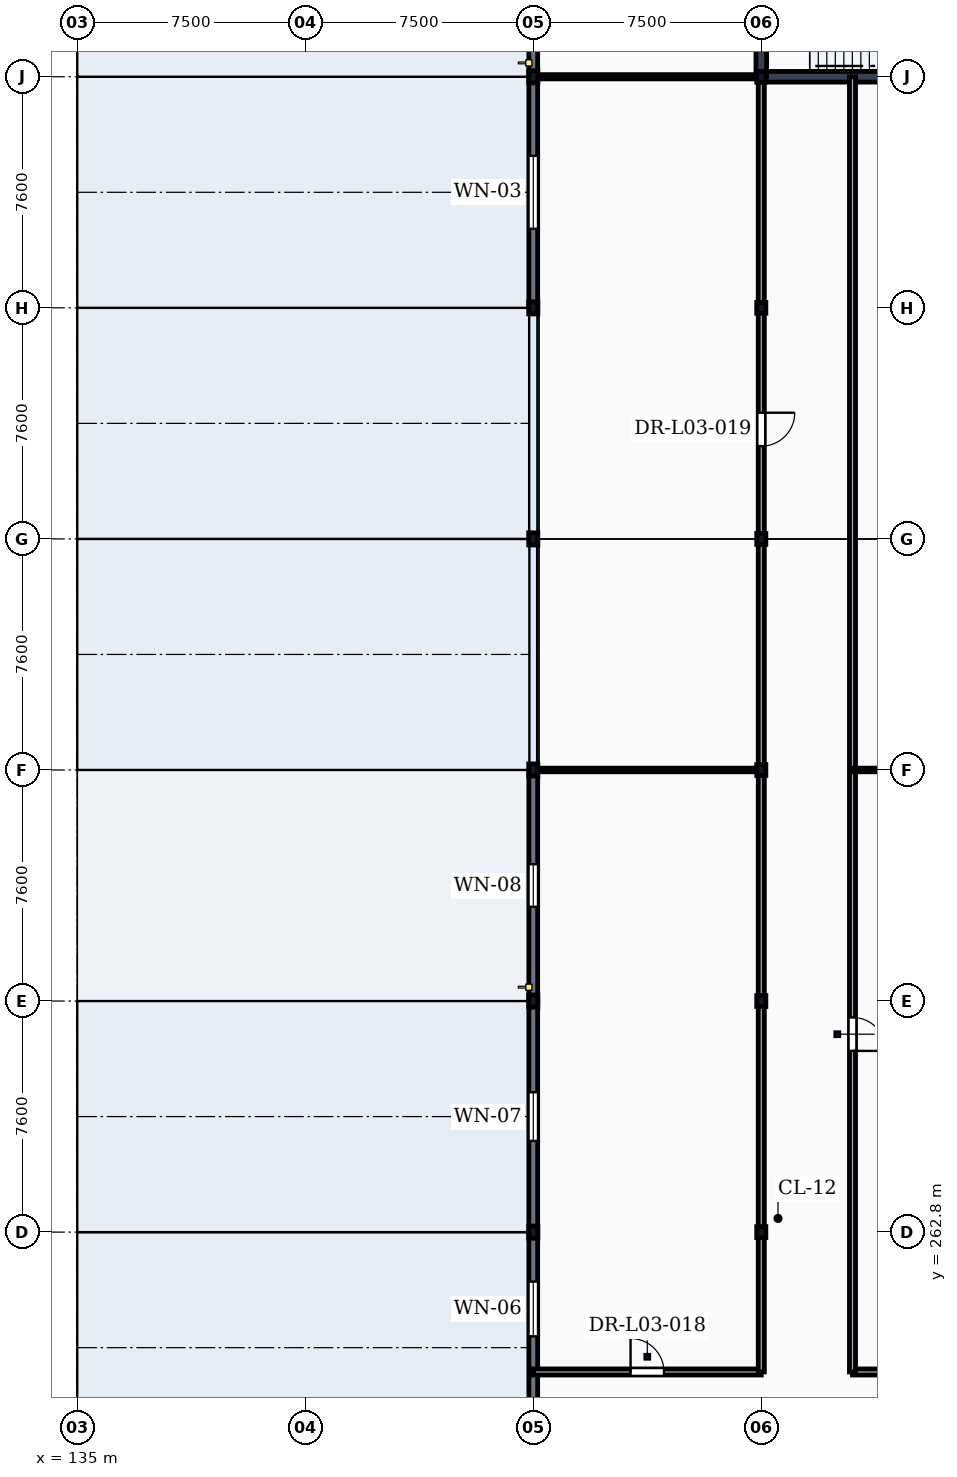
"""IFC4 building model, lengths in metres.
Left out: names, types, materials, properties, quantities, classifications, styles, units other than length and angle.
Written with IfcOpenShell. Run it as: python <this file> out.ifc"""

import sys

from ifc_helpers import new_model, si_unit, direction, frame, frame_2d, origin, origin_2d, place, context, subcontext, project, spatial, rectangle, i_section, extrude, element, fill, save


model = new_model("IFC4")
c1 = context("Model", 3, precision=1e-05, world=origin(), true_north=direction((0.0, 1.0)))
c2 = subcontext(c1, "Body", "Model", "MODEL_VIEW")
j1 = project(units=[si_unit("LENGTHUNIT", "METRE"), si_unit("PLANEANGLEUNIT", "RADIAN")], contexts=[c1])
p1 = place(None, origin())
s1 = spatial("IfcSite", under=j1, at=p1, CompositionType="ELEMENT")
p2 = place(p1, origin())
s2 = spatial("IfcBuilding", under=s1, at=p2, CompositionType="ELEMENT")
p3 = place(p2, frame((0.0, 0.0, 5.4)))
s3 = spatial("IfcBuildingStorey", under=s2, at=p3, CompositionType="ELEMENT", Elevation=5.4)
for number, where, z_axis, x_axis in (
    (1, (135.0, 262.8, 0.0), (0.0, 0.0, 1.0), (1.0, 0.0, 0.0)),
    (2, (135.0, 270.4, 0.0), (0.0, 0.0, 1.0), (1.0, 0.0, 0.0)),
    (3, (135.0, 278.0, 0.0), (0.0, 0.0, 1.0), (1.0, 0.0, 0.0)),
    (4, (135.0, 285.6, 0.0), (0.0, 0.0, 1.0), (1.0, 0.0, 0.0)),
    (5, (135.0, 293.2, 0.0), (0.0, 0.0, 1.0), (1.0, 0.0, 0.0)),
    (6, (135.0, 300.8, 0.0), (0.0, 0.0, 1.0), (1.0, 0.0, 0.0)),
):
    element("IfcColumn", number, at=place(p3, frame(where, z_axis=z_axis, x_axis=x_axis)), inside=s3, PredefinedType="COLUMN", context=c2, shape_type="SweptSolid", body=[
        extrude(i_section(OverallWidth=0.3, OverallDepth=0.45, WebThickness=0.014, FlangeThickness=0.026, FilletRadius=0.027, at=origin_2d()), origin(), (0.0, 0.0, 1.0), 5.1),
    ])
for number, where, z_axis, x_axis in (
    (7, (142.5, 262.8, 0.0), (0.0, 0.0, 1.0), (1.0, 0.0, 0.0)),
    (8, (142.5, 270.4, 0.0), (0.0, 0.0, 1.0), (1.0, 0.0, 0.0)),
    (9, (142.5, 278.0, 0.0), (0.0, 0.0, 1.0), (1.0, 0.0, 0.0)),
    (10, (142.5, 285.6, 0.0), (0.0, 0.0, 1.0), (1.0, 0.0, 0.0)),
    (11, (142.5, 293.2, 0.0), (0.0, 0.0, 1.0), (1.0, 0.0, 0.0)),
    (12, (142.5, 300.8, 0.0), (0.0, 0.0, 1.0), (1.0, 0.0, 0.0)),
):
    element("IfcColumn", number, at=place(p3, frame(where, z_axis=z_axis, x_axis=x_axis)), inside=s3, PredefinedType="COLUMN", context=c2, shape_type="SweptSolid", body=[
        extrude(i_section(OverallWidth=0.3, OverallDepth=0.4, WebThickness=0.013, FlangeThickness=0.024, FilletRadius=0.027, at=origin_2d()), origin(), (0.0, 0.0, 1.0), 5.1),
    ])
for number, where, z_axis, x_axis in (
    (13, (150.0, 262.8, 0.0), (0.0, 0.0, 1.0), (1.0, 0.0, 0.0)),
    (14, (150.0, 270.4, 0.0), (0.0, 0.0, 1.0), (1.0, 0.0, 0.0)),
    (15, (150.0, 278.0, 0.0), (0.0, 0.0, 1.0), (1.0, 0.0, 0.0)),
    (16, (150.0, 285.6, 0.0), (0.0, 0.0, 1.0), (1.0, 0.0, 0.0)),
    (17, (150.0, 293.2, 0.0), (0.0, 0.0, 1.0), (1.0, 0.0, 0.0)),
    (18, (150.0, 300.8, 0.0), (0.0, 0.0, 1.0), (1.0, 0.0, 0.0)),
):
    element("IfcColumn", number, at=place(p3, frame(where, z_axis=z_axis, x_axis=x_axis)), inside=s3, PredefinedType="COLUMN", context=c2, shape_type="SweptSolid", body=[
        extrude(i_section(OverallWidth=0.3, OverallDepth=0.45, WebThickness=0.014, FlangeThickness=0.026, FilletRadius=0.027, at=origin_2d()), origin(), (0.0, 0.0, 1.0), 5.1),
    ])
for number, where, z_axis, x_axis in (
    (19, (157.5, 262.8, 0.0), (0.0, 0.0, 1.0), (1.0, 0.0, 0.0)),
    (20, (157.5, 270.4, 0.0), (0.0, 0.0, 1.0), (1.0, 0.0, 0.0)),
    (21, (157.5, 278.0, 0.0), (0.0, 0.0, 1.0), (1.0, 0.0, 0.0)),
    (22, (157.5, 285.6, 0.0), (0.0, 0.0, 1.0), (1.0, 0.0, 0.0)),
    (23, (157.5, 293.2, 0.0), (0.0, 0.0, 1.0), (1.0, 0.0, 0.0)),
    (24, (157.5, 300.8, 0.0), (0.0, 0.0, 1.0), (1.0, 0.0, 0.0)),
):
    element("IfcColumn", number, at=place(p3, frame(where, z_axis=z_axis, x_axis=x_axis)), inside=s3, PredefinedType="COLUMN", context=c2, shape_type="SweptSolid", body=[
        extrude(i_section(OverallWidth=0.3, OverallDepth=0.4, WebThickness=0.013, FlangeThickness=0.024, FilletRadius=0.027, at=origin_2d()), origin(), (0.0, 0.0, 1.0), 5.1),
    ])
p4 = place(p3, frame((135.0, 255.206, 0.0), z_axis=(0.0, 0.0, 1.0), x_axis=(0.0, 1.0, 0.0)))
e25 = element("IfcWall", 25, at=p4, inside=s3, PredefinedType="SOLIDWALL", context=c2, shape_type="SweptSolid", body=[
    extrude(rectangle(XDim=7.588, YDim=0.29, at=frame_2d((3.794, 0.0))), origin(), (0.0, 0.0, 1.0), 4.578),
])
p5 = place(p4, frame((4.066, 0.0, 0.95)))
e26 = element("IfcOpeningElement", 26, at=p5, cuts=e25, PredefinedType="OPENING", context=c2, shape_type="SweptSolid", body=[
    extrude(rectangle(XDim=2.0, YDim=2.6, at=frame_2d((1.0, 1.3))), frame((0.0, 0.16, 0.0), z_axis=(0.0, -1.0, 0.0), x_axis=(1.0, 0.0, 0.0)), (0.0, 0.0, 1.0), 0.32),
])
p6 = place(p3, frame((135.0, 262.806, 0.0), z_axis=(0.0, 0.0, 1.0), x_axis=(0.0, 1.0, 0.0)))
e27 = element("IfcWall", 27, at=p6, inside=s3, PredefinedType="SOLIDWALL", context=c2, shape_type="SweptSolid", body=[
    extrude(rectangle(XDim=7.588, YDim=0.29, at=frame_2d((3.794, 0.0))), origin(), (0.0, 0.0, 1.0), 4.578),
])
p7 = place(p6, frame((2.894, 0.0, 0.95)))
e28 = element("IfcOpeningElement", 28, at=p7, cuts=e27, PredefinedType="OPENING", context=c2, shape_type="SweptSolid", body=[
    extrude(rectangle(XDim=1.8, YDim=2.6, at=frame_2d((0.9, 1.3))), frame((0.0, 0.16, 0.0), z_axis=(0.0, -1.0, 0.0), x_axis=(1.0, 0.0, 0.0)), (0.0, 0.0, 1.0), 0.32),
])
p8 = place(p3, frame((135.0, 270.406, 0.0), z_axis=(0.0, 0.0, 1.0), x_axis=(0.0, 1.0, 0.0)))
e29 = element("IfcWall", 29, at=p8, inside=s3, PredefinedType="SOLIDWALL", context=c2, shape_type="SweptSolid", body=[
    extrude(rectangle(XDim=7.588, YDim=0.29, at=frame_2d((3.794, 0.0))), origin(), (0.0, 0.0, 1.0), 4.578),
])
p9 = place(p8, frame((2.994, 0.0, 0.95)))
e30 = element("IfcOpeningElement", 30, at=p9, cuts=e29, PredefinedType="OPENING", context=c2, shape_type="SweptSolid", body=[
    extrude(rectangle(XDim=1.6, YDim=2.4, at=frame_2d((0.8, 1.2))), frame((0.0, 0.16, 0.0), z_axis=(0.0, -1.0, 0.0), x_axis=(1.0, 0.0, 0.0)), (0.0, 0.0, 1.0), 0.32),
])
p10 = place(p3, frame((135.0, 293.206, 0.0), z_axis=(0.0, 0.0, 1.0), x_axis=(0.0, 1.0, 0.0)))
e31 = element("IfcWall", 31, at=p10, inside=s3, PredefinedType="SOLIDWALL", context=c2, shape_type="SweptSolid", body=[
    extrude(rectangle(XDim=7.588, YDim=0.29, at=frame_2d((3.794, 0.0))), origin(), (0.0, 0.0, 1.0), 4.578),
])
p11 = place(p10, frame((2.494, 0.0, 0.95)))
e32 = element("IfcOpeningElement", 32, at=p11, cuts=e31, PredefinedType="OPENING", context=c2, shape_type="SweptSolid", body=[
    extrude(rectangle(XDim=2.6, YDim=3.0, at=frame_2d((1.3, 1.5))), frame((0.0, 0.16, 0.0), z_axis=(0.0, -1.0, 0.0), x_axis=(1.0, 0.0, 0.0)), (0.0, 0.0, 1.0), 0.32),
])
p12 = place(p3, frame((135.0, 300.806, 0.0), z_axis=(0.0, 0.0, 1.0), x_axis=(0.0, 1.0, 0.0)))
e33 = element("IfcWall", 33, at=p12, inside=s3, PredefinedType="SOLIDWALL", context=c2, shape_type="SweptSolid", body=[
    extrude(rectangle(XDim=7.588, YDim=0.29, at=frame_2d((3.794, 0.0))), origin(), (0.0, 0.0, 1.0), 4.578),
])
p13 = place(p12, frame((2.594, 0.0, 0.95)))
e34 = element("IfcOpeningElement", 34, at=p13, cuts=e33, PredefinedType="OPENING", context=c2, shape_type="SweptSolid", body=[
    extrude(rectangle(XDim=2.4, YDim=2.8, at=frame_2d((1.2, 1.4))), frame((0.0, 0.16, 0.0), z_axis=(0.0, -1.0, 0.0), x_axis=(1.0, 0.0, 0.0)), (0.0, 0.0, 1.0), 0.32),
])
p14 = place(p3, frame((135.1, 248.6, 5.1), z_axis=(0.0, 0.0, 1.0), x_axis=(0.0, 1.0, 0.0)))
e35 = element("IfcWall", 35, at=p14, inside=s3, PredefinedType="PARAPET", context=c2, shape_type="SweptSolid", body=[
    extrude(rectangle(XDim=89.2, YDim=0.18, at=frame_2d((44.6, 0.0))), origin(), (0.0, 0.0, 1.0), 1.2),
])
p15 = place(p3, frame((157.5, 300.8, 0.0), z_axis=(0.0, 0.0, 1.0), x_axis=(1.0, 0.0, 0.0)))
e36 = element("IfcWall", 36, at=p15, inside=s3, PredefinedType="SHEAR", context=c2, shape_type="SweptSolid", body=[
    extrude(rectangle(XDim=7.5, YDim=0.35, at=frame_2d((3.75, 0.0))), origin(), (0.0, 0.0, 1.0), 4.86),
])
p16 = place(p3, frame((157.5, 300.8, 0.0), z_axis=(0.0, 0.0, 1.0), x_axis=(0.0, 1.0, 0.0)))
e37 = element("IfcWall", 37, at=p16, inside=s3, PredefinedType="SHEAR", context=c2, shape_type="SweptSolid", body=[
    extrude(rectangle(XDim=7.6, YDim=0.35, at=frame_2d((3.8, 0.0))), origin(), (0.0, 0.0, 1.0), 4.86),
])
p17 = place(p3, frame((135.0, 258.2, 0.0), z_axis=(0.0, 0.0, 1.0), x_axis=(1.0, 0.0, 0.0)))
e38 = element("IfcWall", 38, at=p17, inside=s3, PredefinedType="PARTITIONING", context=c2, shape_type="SweptSolid", body=[
    extrude(rectangle(XDim=22.5, YDim=0.2, at=frame_2d((11.25, 0.0))), origin(), (0.0, 0.0, 1.0), 4.85),
])
p18 = place(p17, frame((10.25, 0.0, 0.0)))
e39 = element("IfcOpeningElement", 39, at=p18, cuts=e38, PredefinedType="OPENING", context=c2, shape_type="SweptSolid", body=[
    extrude(rectangle(XDim=1.5, YDim=2.25, at=frame_2d((0.75, 1.125))), frame((0.0, 0.115, 0.0), z_axis=(0.0, -1.0, 0.0), x_axis=(1.0, 0.0, 0.0)), (0.0, 0.0, 1.0), 0.23),
])
p19 = place(p3, frame((157.5, 258.2, 0.0), z_axis=(0.0, 0.0, 1.0), x_axis=(0.0, 1.0, 0.0)))
e40 = element("IfcWall", 40, at=p19, inside=s3, PredefinedType="PARTITIONING", context=c2, shape_type="SweptSolid", body=[
    extrude(rectangle(XDim=42.6, YDim=0.2, at=frame_2d((21.3, 0.0))), origin(), (0.0, 0.0, 1.0), 4.498),
])
p20 = place(p19, frame((9.45, 0.0, 0.0)))
e41 = element("IfcOpeningElement", 41, at=p20, cuts=e40, PredefinedType="OPENING", context=c2, shape_type="SweptSolid", body=[
    extrude(rectangle(XDim=1.1, YDim=2.1, at=frame_2d((0.55, 1.05))), frame((0.0, 0.115, 0.0), z_axis=(0.0, -1.0, 0.0), x_axis=(1.0, 0.0, 0.0)), (0.0, 0.0, 1.0), 0.23),
])
p21 = place(p19, frame((30.45, 0.0, 0.0)))
e42 = element("IfcOpeningElement", 42, at=p21, cuts=e40, PredefinedType="OPENING", context=c2, shape_type="SweptSolid", body=[
    extrude(rectangle(XDim=1.1, YDim=2.1, at=frame_2d((0.55, 1.05))), frame((0.0, 0.115, 0.0), z_axis=(0.0, -1.0, 0.0), x_axis=(1.0, 0.0, 0.0)), (0.0, 0.0, 1.0), 0.23),
])
p22 = place(p3, frame((160.5, 258.2, 0.0), z_axis=(0.0, 0.0, 1.0), x_axis=(0.0, 1.0, 0.0)))
e43 = element("IfcWall", 43, at=p22, inside=s3, PredefinedType="PARTITIONING", context=c2, shape_type="SweptSolid", body=[
    extrude(rectangle(XDim=42.6, YDim=0.2, at=frame_2d((21.3, 0.0))), origin(), (0.0, 0.0, 1.0), 4.86),
])
p23 = place(p22, frame((20.34, 0.0, 0.0)))
e44 = element("IfcOpeningElement", 44, at=p23, cuts=e43, PredefinedType="OPENING", context=c2, shape_type="SweptSolid", body=[
    extrude(rectangle(XDim=1.8, YDim=2.4, at=frame_2d((0.9, 1.2))), frame((0.0, 0.115, 0.0), z_axis=(0.0, -1.0, 0.0), x_axis=(1.0, 0.0, 0.0)), (0.0, 0.0, 1.0), 0.23),
])
p24 = place(p3, frame((135.0, 278.0, 0.0), z_axis=(0.0, 0.0, 1.0), x_axis=(1.0, 0.0, 0.0)))
e45 = element("IfcWall", 45, at=p24, inside=s3, PredefinedType="PARTITIONING", context=c2, shape_type="SweptSolid", body=[
    extrude(rectangle(XDim=22.5, YDim=0.12, at=frame_2d((11.25, 0.0))), origin(), (0.0, 0.0, 1.0), 4.488),
])
p25 = place(p24, frame((8.3, 0.0, 0.0)))
e46 = element("IfcOpeningElement", 46, at=p25, cuts=e45, PredefinedType="OPENING", context=c2, shape_type="SweptSolid", body=[
    extrude(rectangle(XDim=1.0, YDim=2.1, at=frame_2d((0.5, 1.05))), frame((0.0, 0.075, 0.0), z_axis=(0.0, -1.0, 0.0), x_axis=(1.0, 0.0, 0.0)), (0.0, 0.0, 1.0), 0.15),
])
p26 = place(p3, frame((135.0, 300.8, 0.0), z_axis=(0.0, 0.0, 1.0), x_axis=(1.0, 0.0, 0.0)))
e47 = element("IfcWall", 47, at=p26, inside=s3, PredefinedType="PARTITIONING", context=c2, shape_type="SweptSolid", body=[
    extrude(rectangle(XDim=22.5, YDim=0.12, at=frame_2d((11.25, 0.0))), origin(), (0.0, 0.0, 1.0), 4.488),
])
p27 = place(p26, frame((8.3, 0.0, 0.0)))
e48 = element("IfcOpeningElement", 48, at=p27, cuts=e47, PredefinedType="OPENING", context=c2, shape_type="SweptSolid", body=[
    extrude(rectangle(XDim=1.0, YDim=2.1, at=frame_2d((0.5, 1.05))), frame((0.0, 0.075, 0.0), z_axis=(0.0, -1.0, 0.0), x_axis=(1.0, 0.0, 0.0)), (0.0, 0.0, 1.0), 0.15),
])
p28 = place(p3, frame((160.5, 258.2, 0.0), z_axis=(0.0, 0.0, 1.0), x_axis=(1.0, 0.0, 0.0)))
e49 = element("IfcWall", 49, at=p28, inside=s3, PredefinedType="PARTITIONING", context=c2, shape_type="SweptSolid", body=[
    extrude(rectangle(XDim=94.5, YDim=0.2, at=frame_2d((47.25, 0.0))), origin(), (0.0, 0.0, 1.0), 4.86),
])
p29 = place(p28, frame((24.1, 0.0, 0.0)))
e50 = element("IfcOpeningElement", 50, at=p29, cuts=e49, PredefinedType="OPENING", context=c2, shape_type="SweptSolid", body=[
    extrude(rectangle(XDim=1.8, YDim=2.4, at=frame_2d((0.9, 1.2))), frame((0.0, 0.115, 0.0), z_axis=(0.0, -1.0, 0.0), x_axis=(1.0, 0.0, 0.0)), (0.0, 0.0, 1.0), 0.23),
])
p30 = place(p28, frame((77.1, 0.0, 0.0)))
e51 = element("IfcOpeningElement", 51, at=p30, cuts=e49, PredefinedType="OPENING", context=c2, shape_type="SweptSolid", body=[
    extrude(rectangle(XDim=1.8, YDim=2.4, at=frame_2d((0.9, 1.2))), frame((0.0, 0.115, 0.0), z_axis=(0.0, -1.0, 0.0), x_axis=(1.0, 0.0, 0.0)), (0.0, 0.0, 1.0), 0.23),
])
p31 = place(p5, origin())
e52 = element("IfcWindow", 52, at=p31, inside=s3, PartitioningType="DOUBLE_PANEL_VERTICAL", PredefinedType="WINDOW", context=c2, shape_type="SweptSolid", body=[
    extrude(rectangle(XDim=2.0, YDim=2.6, at=frame_2d((1.0, 1.3))), frame((0.0, 0.03, 0.0), z_axis=(0.0, -1.0, 0.0), x_axis=(1.0, 0.0, 0.0)), (0.0, 0.0, 1.0), 0.06),
])
fill(e26, e52)
p32 = place(p7, origin())
e53 = element("IfcWindow", 53, at=p32, inside=s3, PartitioningType="DOUBLE_PANEL_VERTICAL", PredefinedType="WINDOW", context=c2, shape_type="SweptSolid", body=[
    extrude(rectangle(XDim=1.8, YDim=2.6, at=frame_2d((0.9, 1.3))), frame((0.0, 0.03, 0.0), z_axis=(0.0, -1.0, 0.0), x_axis=(1.0, 0.0, 0.0)), (0.0, 0.0, 1.0), 0.06),
])
fill(e28, e53)
p33 = place(p9, origin())
e54 = element("IfcWindow", 54, at=p33, inside=s3, PartitioningType="SINGLE_PANEL", PredefinedType="WINDOW", context=c2, shape_type="SweptSolid", body=[
    extrude(rectangle(XDim=1.6, YDim=2.4, at=frame_2d((0.8, 1.2))), frame((0.0, 0.03, 0.0), z_axis=(0.0, -1.0, 0.0), x_axis=(1.0, 0.0, 0.0)), (0.0, 0.0, 1.0), 0.06),
])
fill(e30, e54)
p34 = place(p11, origin())
e55 = element("IfcWindow", 55, at=p34, inside=s3, PartitioningType="DOUBLE_PANEL_VERTICAL", PredefinedType="WINDOW", context=c2, shape_type="SweptSolid", body=[
    extrude(rectangle(XDim=2.6, YDim=3.0, at=frame_2d((1.3, 1.5))), frame((0.0, 0.03, 0.0), z_axis=(0.0, -1.0, 0.0), x_axis=(1.0, 0.0, 0.0)), (0.0, 0.0, 1.0), 0.06),
])
fill(e32, e55)
p35 = place(p2, frame((0.0, 0.0, 10.5)))
p36 = place(p35, frame((0.0, 0.0, -0.25)))
p37 = place(p36, frame((138.75, 274.2, -0.01)))
p38 = place(p37, frame((0.0, 0.0, 0.21)))
e56 = element("IfcWindow", 56, at=p38, inside=s3, PartitioningType="SINGLE_PANEL", PredefinedType="SKYLIGHT", context=c2, shape_type="SweptSolid", body=[
    extrude(rectangle(XDim=1.5, YDim=2.1, at=origin_2d()), origin(), (0.0, 0.0, 1.0), 0.05),
])
p39 = place(p18, origin())
e57 = element("IfcDoor", 57, at=p39, inside=s3, OperationType="DOUBLE_DOOR_SINGLE_SWING", PredefinedType="DOOR", context=c2, shape_type="SweptSolid", body=[
    extrude(rectangle(XDim=1.5, YDim=2.25, at=frame_2d((0.75, 1.125))), frame((0.0, 0.025, 0.0), z_axis=(0.0, -1.0, 0.0), x_axis=(1.0, 0.0, 0.0)), (0.0, 0.0, 1.0), 0.05),
])
fill(e39, e57)
p40 = place(p20, origin())
e58 = element("IfcDoor", 58, at=p40, inside=s3, OperationType="SINGLE_SWING_LEFT", PredefinedType="DOOR", context=c2, shape_type="SweptSolid", body=[
    extrude(rectangle(XDim=1.1, YDim=2.1, at=frame_2d((0.55, 1.05))), frame((0.0, 0.025, 0.0), z_axis=(0.0, -1.0, 0.0), x_axis=(1.0, 0.0, 0.0)), (0.0, 0.0, 1.0), 0.05),
])
fill(e41, e58)
p41 = place(p21, origin())
e59 = element("IfcDoor", 59, at=p41, inside=s3, OperationType="SINGLE_SWING_RIGHT", PredefinedType="DOOR", context=c2, shape_type="SweptSolid", body=[
    extrude(rectangle(XDim=1.1, YDim=2.1, at=frame_2d((0.55, 1.05))), frame((0.0, 0.025, 0.0), z_axis=(0.0, -1.0, 0.0), x_axis=(1.0, 0.0, 0.0)), (0.0, 0.0, 1.0), 0.05),
])
fill(e42, e59)
p42 = place(p23, frame((1.8, 0.0, 0.0), z_axis=(0.0, 0.0, 1.0), x_axis=(-1.0, 0.0, 0.0)))
e60 = element("IfcDoor", 60, at=p42, inside=s3, OperationType="DOUBLE_DOOR_SINGLE_SWING", PredefinedType="DOOR", context=c2, shape_type="SweptSolid", body=[
    extrude(rectangle(XDim=1.8, YDim=2.4, at=frame_2d((0.9, 1.2))), frame((0.0, 0.025, 0.0), z_axis=(0.0, -1.0, 0.0), x_axis=(1.0, 0.0, 0.0)), (0.0, 0.0, 1.0), 0.05),
])
fill(e44, e60)
p43 = place(p25, origin())
e61 = element("IfcDoor", 61, at=p43, inside=s3, OperationType="SINGLE_SWING_LEFT", PredefinedType="DOOR", context=c2, shape_type="SweptSolid", body=[
    extrude(rectangle(XDim=1.0, YDim=2.1, at=frame_2d((0.5, 1.05))), frame((0.0, 0.025, 0.0), z_axis=(0.0, -1.0, 0.0), x_axis=(1.0, 0.0, 0.0)), (0.0, 0.0, 1.0), 0.05),
])
fill(e46, e61)
p44 = place(p27, frame((1.0, 0.0, 0.0), z_axis=(0.0, 0.0, 1.0), x_axis=(-1.0, 0.0, 0.0)))
e62 = element("IfcDoor", 62, at=p44, inside=s3, OperationType="SINGLE_SWING_RIGHT", PredefinedType="DOOR", context=c2, shape_type="SweptSolid", body=[
    extrude(rectangle(XDim=1.0, YDim=2.1, at=frame_2d((0.5, 1.05))), frame((0.0, 0.025, 0.0), z_axis=(0.0, -1.0, 0.0), x_axis=(1.0, 0.0, 0.0)), (0.0, 0.0, 1.0), 0.05),
])
fill(e48, e62)
save(model, sys.argv[1])
